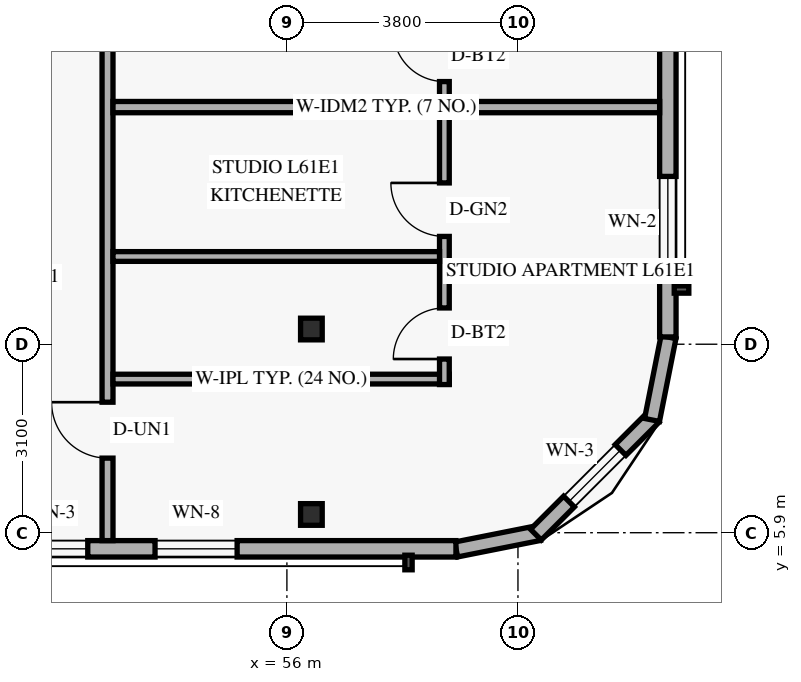
"""IFC4 building model, lengths in metres.
Left out: names, types, materials, properties, quantities, classifications, styles, units other than length and angle.
Written with IfcOpenShell. Run it as: python <this file> out.ifc"""

import sys

from ifc_helpers import new_model, si_unit, direction, frame, frame_2d, origin, origin_2d, place, context, subcontext, project, spatial, rectangle, hollow_rectangle, extrude, element, fill, save


model = new_model("IFC4")
c1 = context("Model", 3, precision=1e-05, world=origin(), true_north=direction((0.0, 1.0)))
c2 = subcontext(c1, "Body", "Model", "MODEL_VIEW")
j1 = project(units=[si_unit("LENGTHUNIT", "METRE"), si_unit("PLANEANGLEUNIT", "RADIAN")], contexts=[c1])
p1 = place(None, origin())
s1 = spatial("IfcSite", under=j1, at=p1, CompositionType="ELEMENT")
p2 = place(p1, origin())
s2 = spatial("IfcBuilding", under=s1, at=p2, CompositionType="ELEMENT")
p3 = place(p2, frame((0.0, 0.0, 235.2)))
s3 = spatial("IfcBuildingStorey", under=s2, at=p3, CompositionType="ELEMENT", Elevation=235.2)
for number, where, z_axis, x_axis in (
    (1, (56.298, 6.2, 0.0), (0.058, 0.0, 0.998), (0.0, 1.0, 0.0)),
    (2, (56.298, 9.25, 0.0), (0.058, 0.0, 0.998), (0.0, 1.0, 0.0)),
):
    element("IfcColumn", number, at=place(p3, frame(where, z_axis=z_axis, x_axis=x_axis)), inside=s3, PredefinedType="COLUMN", context=c2, shape_type="SweptSolid", body=[
        extrude(hollow_rectangle(XDim=0.356, YDim=0.356, WallThickness=0.016, at=origin_2d()), origin(), (0.0, 0.0, 1.0), 3.606),
    ])
p4 = place(p3, frame((58.783, 5.624, 0.0), z_axis=(0.0, 0.0, 1.0), x_axis=(0.980809899341, 0.19496651342, 0.0)))
e3 = element("IfcWall", 3, at=p4, inside=s3, PredefinedType="SOLIDWALL", context=c2, shape_type="SweptSolid", body=[
    extrude(rectangle(XDim=1.389, YDim=0.25, at=frame_2d((0.694, 0.0))), origin(), (0.0, 0.0, 1.0), 3.36),
])
p5 = place(p3, frame((60.095, 5.868, 0.0), z_axis=(0.0, 0.0, 1.0), x_axis=(0.707106781187, 0.707106781187, 0.0)))
e4 = element("IfcWall", 4, at=p5, inside=s3, PredefinedType="SOLIDWALL", context=c2, shape_type="SweptSolid", body=[
    extrude(rectangle(XDim=2.739, YDim=0.25, at=frame_2d((1.37, 0.0))), origin(), (0.0, 0.0, 1.0), 3.36),
])
p6 = place(p5, frame((0.77, 0.0, 0.85)))
e5 = element("IfcOpeningElement", 5, at=p6, cuts=e4, PredefinedType="OPENING", context=c2, shape_type="SweptSolid", body=[
    extrude(rectangle(XDim=1.2, YDim=1.5, at=frame_2d((0.6, 0.75))), frame((0.0, 0.135, 0.0), z_axis=(0.0, -1.0, 0.0), x_axis=(1.0, 0.0, 0.0)), (0.0, 0.0, 1.0), 0.27),
])
p7 = place(p3, frame((62.005, 7.754, 0.0), z_axis=(0.0, 0.0, 1.0), x_axis=(0.195135625965, 0.9807762678, 0.0)))
e6 = element("IfcWall", 6, at=p7, inside=s3, PredefinedType="SOLIDWALL", context=c2, shape_type="SweptSolid", body=[
    extrude(rectangle(XDim=1.389, YDim=0.25, at=frame_2d((0.694, 0.0))), origin(), (0.0, 0.0, 1.0), 3.36),
])
p8 = place(p3, frame((25.82, 5.635, 0.0), z_axis=(0.0, 0.0, 1.0), x_axis=(1.0, 0.0, 0.0)))
e7 = element("IfcWall", 7, at=p8, inside=s3, PredefinedType="SOLIDWALL", context=c2, shape_type="SweptSolid", body=[
    extrude(rectangle(XDim=32.96, YDim=0.27, at=frame_2d((16.48, 0.0))), origin(), (0.0, 0.0, 1.0), 3.36),
])
p9 = place(p8, frame((3.795, 0.0, 0.85)))
e8 = element("IfcOpeningElement", 8, at=p9, cuts=e7, PredefinedType="OPENING", context=c2, shape_type="SweptSolid", body=[
    extrude(rectangle(XDim=1.35, YDim=1.55, at=frame_2d((0.675, 0.775))), frame((0.0, 0.145, 0.0), z_axis=(0.0, -1.0, 0.0), x_axis=(1.0, 0.0, 0.0)), (0.0, 0.0, 1.0), 0.29),
])
p10 = place(p8, frame((16.176, 0.0, 0.85)))
e9 = element("IfcOpeningElement", 9, at=p10, cuts=e7, PredefinedType="OPENING", context=c2, shape_type="SweptSolid", body=[
    extrude(rectangle(XDim=1.35, YDim=1.55, at=frame_2d((0.675, 0.775))), frame((0.0, 0.145, 0.0), z_axis=(0.0, -1.0, 0.0), x_axis=(1.0, 0.0, 0.0)), (0.0, 0.0, 1.0), 0.29),
])
p11 = place(p8, frame((25.705, 0.0, 0.85)))
e10 = element("IfcOpeningElement", 10, at=p11, cuts=e7, PredefinedType="OPENING", context=c2, shape_type="SweptSolid", body=[
    extrude(rectangle(XDim=1.2, YDim=1.5, at=frame_2d((0.6, 0.75))), frame((0.0, 0.145, 0.0), z_axis=(0.0, -1.0, 0.0), x_axis=(1.0, 0.0, 0.0)), (0.0, 0.0, 1.0), 0.29),
])
p12 = place(p8, frame((28.011, 0.0, 0.85)))
e11 = element("IfcOpeningElement", 11, at=p12, cuts=e7, PredefinedType="OPENING", context=c2, shape_type="SweptSolid", body=[
    extrude(rectangle(XDim=1.35, YDim=1.55, at=frame_2d((0.675, 0.775))), frame((0.0, 0.145, 0.0), z_axis=(0.0, -1.0, 0.0), x_axis=(1.0, 0.0, 0.0)), (0.0, 0.0, 1.0), 0.29),
])
p13 = place(p3, frame((62.265, 9.12, 0.0), z_axis=(0.0, 0.0, 1.0), x_axis=(0.0, 1.0, 0.0)))
e12 = element("IfcWall", 12, at=p13, inside=s3, PredefinedType="SOLIDWALL", context=c2, shape_type="SweptSolid", body=[
    extrude(rectangle(XDim=12.17, YDim=0.27, at=frame_2d((6.085, 0.0))), origin(), (0.0, 0.0, 1.0), 3.36),
])
p14 = place(p13, frame((1.14, 0.0, 0.85)))
e13 = element("IfcOpeningElement", 13, at=p14, cuts=e12, PredefinedType="OPENING", context=c2, shape_type="SweptSolid", body=[
    extrude(rectangle(XDim=1.5, YDim=1.55, at=frame_2d((0.75, 0.775))), frame((0.0, 0.145, 0.0), z_axis=(0.0, -1.0, 0.0), x_axis=(1.0, 0.0, 0.0)), (0.0, 0.0, 1.0), 0.29),
])
p15 = place(p13, frame((7.225, 0.0, 0.85)))
e14 = element("IfcOpeningElement", 14, at=p15, cuts=e12, PredefinedType="OPENING", context=c2, shape_type="SweptSolid", body=[
    extrude(rectangle(XDim=1.5, YDim=1.55, at=frame_2d((0.75, 0.775))), frame((0.0, 0.145, 0.0), z_axis=(0.0, -1.0, 0.0), x_axis=(1.0, 0.0, 0.0)), (0.0, 0.0, 1.0), 0.29),
])
p16 = place(p3, frame((53.05, 5.77, 0.0), z_axis=(0.0, 0.0, 1.0), x_axis=(0.0, 1.0, 0.0)))
e15 = element("IfcWall", 15, at=p16, inside=s3, PredefinedType="STANDARD", context=c2, shape_type="SweptSolid", body=[
    extrude(rectangle(XDim=36.46, YDim=0.18, at=frame_2d((18.23, 0.0))), origin(), (0.0, 0.0, 1.0), 2.803),
])
p17 = place(p16, frame((1.357, 0.0, 0.0)))
e16 = element("IfcOpeningElement", 16, at=p17, cuts=e15, PredefinedType="OPENING", context=c2, shape_type="SweptSolid", body=[
    extrude(rectangle(XDim=0.92, YDim=2.15, at=frame_2d((0.46, 1.075))), frame((0.0, 0.1, 0.0), z_axis=(0.0, -1.0, 0.0), x_axis=(1.0, 0.0, 0.0)), (0.0, 0.0, 1.0), 0.2),
])
p18 = place(p16, frame((12.03, 0.0, 0.0)))
e17 = element("IfcOpeningElement", 17, at=p18, cuts=e15, PredefinedType="OPENING", context=c2, shape_type="SweptSolid", body=[
    extrude(rectangle(XDim=0.92, YDim=2.15, at=frame_2d((0.46, 1.075))), frame((0.0, 0.1, 0.0), z_axis=(0.0, -1.0, 0.0), x_axis=(1.0, 0.0, 0.0)), (0.0, 0.0, 1.0), 0.2),
])
p19 = place(p16, frame((20.27, 0.0, 0.0)))
e18 = element("IfcOpeningElement", 18, at=p19, cuts=e15, PredefinedType="OPENING", context=c2, shape_type="SweptSolid", body=[
    extrude(rectangle(XDim=0.92, YDim=2.15, at=frame_2d((0.46, 1.075))), frame((0.0, 0.1, 0.0), z_axis=(0.0, -1.0, 0.0), x_axis=(1.0, 0.0, 0.0)), (0.0, 0.0, 1.0), 0.2),
])
p20 = place(p16, frame((28.21, 0.0, 0.0)))
e19 = element("IfcOpeningElement", 19, at=p20, cuts=e15, PredefinedType="OPENING", context=c2, shape_type="SweptSolid", body=[
    extrude(rectangle(XDim=0.92, YDim=2.15, at=frame_2d((0.46, 1.075))), frame((0.0, 0.1, 0.0), z_axis=(0.0, -1.0, 0.0), x_axis=(1.0, 0.0, 0.0)), (0.0, 0.0, 1.0), 0.2),
])
p21 = place(p16, frame((35.21, 0.0, 0.0)))
e20 = element("IfcOpeningElement", 20, at=p21, cuts=e15, PredefinedType="OPENING", context=c2, shape_type="SweptSolid", body=[
    extrude(rectangle(XDim=0.92, YDim=2.15, at=frame_2d((0.46, 1.075))), frame((0.0, 0.1, 0.0), z_axis=(0.0, -1.0, 0.0), x_axis=(1.0, 0.0, 0.0)), (0.0, 0.0, 1.0), 0.2),
])
p22 = place(p3, frame((53.14, 8.427, 0.0), z_axis=(0.0, 0.0, 1.0), x_axis=(1.0, 0.0, 0.0)))
e21 = element("IfcWall", 21, at=p22, inside=s3, PredefinedType="PLUMBINGWALL", context=c2, shape_type="SweptSolid", body=[
    extrude(rectangle(XDim=5.53, YDim=0.16, at=frame_2d((2.765, 0.0))), origin(), (0.0, 0.0, 1.0), 2.879),
])
p23 = place(p3, frame((58.59, 8.337, 0.0), z_axis=(0.0, 0.0, 1.0), x_axis=(0.0, 1.0, 0.0)))
e22 = element("IfcWall", 22, at=p23, inside=s3, PredefinedType="PLUMBINGWALL", context=c2, shape_type="SweptSolid", body=[
    extrude(rectangle(XDim=4.563, YDim=0.16, at=frame_2d((2.282, 0.0))), origin(), (0.0, 0.0, 1.0), 3.36),
])
p24 = place(p23, frame((0.42, 0.0, 0.0)))
e23 = element("IfcOpeningElement", 23, at=p24, cuts=e22, PredefinedType="OPENING", context=c2, shape_type="SweptSolid", body=[
    extrude(rectangle(XDim=0.84, YDim=2.12, at=frame_2d((0.42, 1.06))), frame((0.0, 0.09, 0.0), z_axis=(0.0, -1.0, 0.0), x_axis=(1.0, 0.0, 0.0)), (0.0, 0.0, 1.0), 0.18),
])
p25 = place(p23, frame((2.436, 0.0, 0.0)))
e24 = element("IfcOpeningElement", 24, at=p25, cuts=e22, PredefinedType="OPENING", context=c2, shape_type="SweptSolid", body=[
    extrude(rectangle(XDim=0.88, YDim=2.12, at=frame_2d((0.44, 1.06))), frame((0.0, 0.09, 0.0), z_axis=(0.0, -1.0, 0.0), x_axis=(1.0, 0.0, 0.0)), (0.0, 0.0, 1.0), 0.18),
])
p26 = place(p3, frame((53.14, 10.443, 0.0), z_axis=(0.0, 0.0, 1.0), x_axis=(1.0, 0.0, 0.0)))
e25 = element("IfcWall", 25, at=p26, inside=s3, PredefinedType="PLUMBINGWALL", context=c2, shape_type="SweptSolid", body=[
    extrude(rectangle(XDim=5.37, YDim=0.16, at=frame_2d((2.685, 0.0))), origin(), (0.0, 0.0, 1.0), 2.879),
])
p27 = place(p3, frame((53.14, 12.9, 0.0), z_axis=(0.0, 0.0, 1.0), x_axis=(1.0, 0.0, 0.0)))
e26 = element("IfcWall", 26, at=p27, inside=s3, PredefinedType="PARTITIONING", context=c2, shape_type="SweptSolid", body=[
    extrude(rectangle(XDim=8.99, YDim=0.185, at=frame_2d((4.495, 0.0))), origin(), (0.0, 0.0, 1.0), 2.879),
])
p28 = place(p3, frame((58.59, 12.992, 0.0), z_axis=(0.0, 0.0, 1.0), x_axis=(0.0, 1.0, 0.0)))
e27 = element("IfcWall", 27, at=p28, inside=s3, PredefinedType="PLUMBINGWALL", context=c2, shape_type="SweptSolid", body=[
    extrude(rectangle(XDim=4.538, YDim=0.16, at=frame_2d((2.269, 0.0))), origin(), (0.0, 0.0, 1.0), 3.36),
])
p29 = place(p28, frame((0.327, 0.0, 0.0)))
e28 = element("IfcOpeningElement", 28, at=p29, cuts=e27, PredefinedType="OPENING", context=c2, shape_type="SweptSolid", body=[
    extrude(rectangle(XDim=0.84, YDim=2.12, at=frame_2d((0.42, 1.06))), frame((0.0, 0.09, 0.0), z_axis=(0.0, -1.0, 0.0), x_axis=(1.0, 0.0, 0.0)), (0.0, 0.0, 1.0), 0.18),
])
p30 = place(p28, frame((2.375, 0.0, 0.0)))
e29 = element("IfcOpeningElement", 29, at=p30, cuts=e27, PredefinedType="OPENING", context=c2, shape_type="SweptSolid", body=[
    extrude(rectangle(XDim=0.88, YDim=2.12, at=frame_2d((0.44, 1.06))), frame((0.0, 0.09, 0.0), z_axis=(0.0, -1.0, 0.0), x_axis=(1.0, 0.0, 0.0)), (0.0, 0.0, 1.0), 0.18),
])
p31 = place(p6, origin())
e30 = element("IfcWindow", 30, at=p31, inside=s3, PartitioningType="SINGLE_PANEL", PredefinedType="WINDOW", context=c2, shape_type="SweptSolid", body=[
    extrude(rectangle(XDim=1.2, YDim=1.5, at=frame_2d((0.6, 0.75))), frame((0.0, 0.03, 0.0), z_axis=(0.0, -1.0, 0.0), x_axis=(1.0, 0.0, 0.0)), (0.0, 0.0, 1.0), 0.06),
])
fill(e5, e30)
p32 = place(p11, origin())
e31 = element("IfcWindow", 31, at=p32, inside=s3, PartitioningType="SINGLE_PANEL", PredefinedType="WINDOW", context=c2, shape_type="SweptSolid", body=[
    extrude(rectangle(XDim=1.2, YDim=1.5, at=frame_2d((0.6, 0.75))), frame((0.0, 0.03, 0.0), z_axis=(0.0, -1.0, 0.0), x_axis=(1.0, 0.0, 0.0)), (0.0, 0.0, 1.0), 0.06),
])
fill(e10, e31)
p33 = place(p12, origin())
e32 = element("IfcWindow", 32, at=p33, inside=s3, PartitioningType="SINGLE_PANEL", PredefinedType="WINDOW", context=c2, shape_type="SweptSolid", body=[
    extrude(rectangle(XDim=1.35, YDim=1.55, at=frame_2d((0.675, 0.775))), frame((0.0, 0.03, 0.0), z_axis=(0.0, -1.0, 0.0), x_axis=(1.0, 0.0, 0.0)), (0.0, 0.0, 1.0), 0.06),
])
fill(e11, e32)
p34 = place(p14, origin())
e33 = element("IfcWindow", 33, at=p34, inside=s3, PartitioningType="SINGLE_PANEL", PredefinedType="WINDOW", context=c2, shape_type="SweptSolid", body=[
    extrude(rectangle(XDim=1.5, YDim=1.55, at=frame_2d((0.75, 0.775))), frame((0.0, 0.03, 0.0), z_axis=(0.0, -1.0, 0.0), x_axis=(1.0, 0.0, 0.0)), (0.0, 0.0, 1.0), 0.06),
])
fill(e13, e33)
p35 = place(p17, origin())
e34 = element("IfcDoor", 34, at=p35, inside=s3, OperationType="SINGLE_SWING_RIGHT", PredefinedType="DOOR", context=c2, shape_type="SweptSolid", body=[
    extrude(rectangle(XDim=0.92, YDim=2.15, at=frame_2d((0.46, 1.075))), frame((0.0, 0.025, 0.0), z_axis=(0.0, -1.0, 0.0), x_axis=(1.0, 0.0, 0.0)), (0.0, 0.0, 1.0), 0.05),
])
fill(e16, e34)
p36 = place(p24, origin())
e35 = element("IfcDoor", 35, at=p36, inside=s3, OperationType="SINGLE_SWING_LEFT", PredefinedType="DOOR", context=c2, shape_type="SweptSolid", body=[
    extrude(rectangle(XDim=0.84, YDim=2.12, at=frame_2d((0.42, 1.06))), frame((0.0, 0.025, 0.0), z_axis=(0.0, -1.0, 0.0), x_axis=(1.0, 0.0, 0.0)), (0.0, 0.0, 1.0), 0.05),
])
fill(e23, e35)
p37 = place(p25, origin())
e36 = element("IfcDoor", 36, at=p37, inside=s3, OperationType="SINGLE_SWING_RIGHT", PredefinedType="DOOR", context=c2, shape_type="SweptSolid", body=[
    extrude(rectangle(XDim=0.88, YDim=2.12, at=frame_2d((0.44, 1.06))), frame((0.0, 0.025, 0.0), z_axis=(0.0, -1.0, 0.0), x_axis=(1.0, 0.0, 0.0)), (0.0, 0.0, 1.0), 0.05),
])
fill(e24, e36)
p38 = place(p29, origin())
e37 = element("IfcDoor", 37, at=p38, inside=s3, OperationType="SINGLE_SWING_RIGHT", PredefinedType="DOOR", context=c2, shape_type="SweptSolid", body=[
    extrude(rectangle(XDim=0.84, YDim=2.12, at=frame_2d((0.42, 1.06))), frame((0.0, 0.025, 0.0), z_axis=(0.0, -1.0, 0.0), x_axis=(1.0, 0.0, 0.0)), (0.0, 0.0, 1.0), 0.05),
])
fill(e28, e37)
save(model, sys.argv[1])
